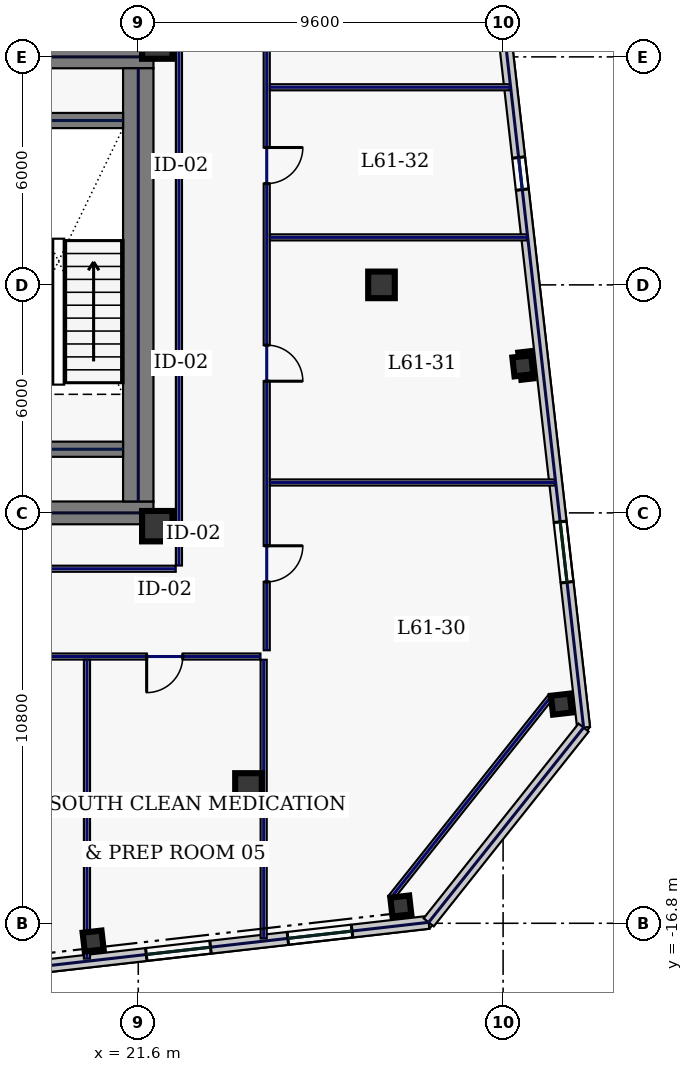
"""IFC4 building model, lengths in metres.
Left out: names, types, materials, properties, quantities, classifications, styles, units other than length and angle.
Written with IfcOpenShell. Run it as: python <this file> out.ifc"""

import sys

from ifc_helpers import new_model, si_unit, direction, frame, frame_2d, origin, origin_2d, place, context, subcontext, project, spatial, rectangle, hollow_rectangle, extrude, element, fill, save


model = new_model("IFC4")
c1 = context("Model", 3, precision=1e-05, world=origin(), true_north=direction((0.0, 1.0)))
c2 = subcontext(c1, "Body", "Model", "MODEL_VIEW")
j1 = project(units=[si_unit("LENGTHUNIT", "METRE"), si_unit("PLANEANGLEUNIT", "RADIAN")], contexts=[c1])
p1 = place(None, origin())
s1 = spatial("IfcSite", under=j1, at=p1, CompositionType="ELEMENT")
p2 = place(p1, origin())
s2 = spatial("IfcBuilding", under=s1, at=p2, CompositionType="ELEMENT")
p3 = place(p2, frame((0.0, 0.0, 263.0)))
s3 = spatial("IfcBuildingStorey", under=s2, at=p3, CompositionType="ELEMENT", Elevation=263.0)
for number, where, z_axis, x_axis in (
    (1, (10.5, 6.0, 0.0), (0.0, 0.0, 1.0), (1.0, 0.0, 0.0)),
    (2, (10.5, -6.0, 0.0), (0.0, 0.0, 1.0), (1.0, 0.0, 0.0)),
):
    element("IfcWall", number, at=place(p3, frame(where, z_axis=z_axis, x_axis=x_axis)), inside=s3, PredefinedType="SHEAR", context=c2, shape_type="SweptSolid", body=[
        extrude(rectangle(XDim=11.5, YDim=0.6, at=frame_2d((5.75, 0.0))), origin(), (0.0, 0.0, 1.0), 3.74),
    ])
p4 = place(p3, frame((21.6, -5.7, 0.0), z_axis=(0.0, 0.0, 1.0), x_axis=(0.0, 1.0, 0.0)))
e3 = element("IfcWall", 3, at=p4, inside=s3, PredefinedType="SHEAR", context=c2, shape_type="SweptSolid", body=[
    extrude(rectangle(XDim=11.4, YDim=0.8, at=frame_2d((5.7, 0.0))), origin(), (0.0, 0.0, 1.0), 3.74),
])
for number, where, z_axis, x_axis in (
    (4, (17.8, -4.325, 0.0), (0.0, 0.0, 1.0), (1.0, 0.0, 0.0)),
    (5, (17.8, 4.325, 0.0), (0.0, 0.0, 1.0), (1.0, 0.0, 0.0)),
):
    element("IfcWall", number, at=place(p3, frame(where, z_axis=z_axis, x_axis=x_axis)), inside=s3, PredefinedType="SHEAR", context=c2, shape_type="SweptSolid", body=[
        extrude(rectangle(XDim=3.4, YDim=0.4, at=frame_2d((1.7, 0.0))), origin(), (0.0, 0.0, 1.0), 3.74),
    ])
for number, where, z_axis, x_axis in (
    (6, (22.1, -6.35, 0.0), (0.0, 0.0, 1.0), (1.0, 0.0, 0.0)),
    (7, (22.1, 6.35, 0.0), (0.0, 0.0, 1.0), (1.0, 0.0, 0.0)),
):
    element("IfcColumn", number, at=place(p3, frame(where, z_axis=z_axis, x_axis=x_axis)), inside=s3, PredefinedType="COLUMN", context=c2, shape_type="SweptSolid", body=[
        extrude(hollow_rectangle(XDim=0.8, YDim=0.8, WallThickness=0.036, at=origin_2d()), origin(), (0.0, 0.0, 1.0), 3.74),
    ])
for number, where, z_axis, x_axis in (
    (8, (24.5, -13.2, 0.0), (0.0, 0.0, 1.0), (1.0, 0.0, 0.0)),
    (9, (28.0, 0.0, 0.0), (0.0, 0.0, 1.0), (1.0, 0.0, 0.0)),
):
    element("IfcColumn", number, at=place(p3, frame(where, z_axis=z_axis, x_axis=x_axis)), inside=s3, PredefinedType="COLUMN", context=c2, shape_type="SweptSolid", body=[
        extrude(hollow_rectangle(XDim=0.7, YDim=0.7, WallThickness=0.032, at=origin_2d()), origin(), (0.0, 0.0, 1.0), 3.74),
    ])
for number, where, z_axis, x_axis in (
    (10, (20.412, -17.268, 0.0), (0.0, 0.0, 1.0), (0.994, 0.113, 0.0)),
    (11, (28.509, -16.345, 0.0), (0.0, 0.0, 1.0), (0.994, 0.113, 0.0)),
    (12, (32.734, -11.033, 0.0), (0.0, 0.0, 1.0), (0.994, 0.113, 0.0)),
    (13, (31.72, -2.131, 0.0), (0.0, 0.0, 1.0), (0.994, 0.113, 0.0)),
):
    element("IfcColumn", number, at=place(p3, frame(where, z_axis=z_axis, x_axis=x_axis)), inside=s3, PredefinedType="COLUMN", context=c2, shape_type="SweptSolid", body=[
        extrude(hollow_rectangle(XDim=0.5, YDim=0.5, WallThickness=0.025, at=origin_2d()), origin(), (0.0, 0.0, 1.0), 3.74),
    ])
p5 = place(p3, frame((10.71, -18.886, 0.0), z_axis=(0.0, 0.0, 1.0), x_axis=(0.993572271362, 0.113199565282, 0.0)))
e14 = element("IfcWall", 14, at=p5, inside=s3, PredefinedType="STANDARD", context=c2, shape_type="SweptSolid", body=[
    extrude(rectangle(XDim=18.651, YDim=0.34, at=frame_2d((9.326, 0.0))), origin(), (0.0, 0.0, 1.0), 3.74),
])
p6 = place(p5, frame((3.024, 0.0, 0.88)))
e15 = element("IfcOpeningElement", 15, at=p6, cuts=e14, PredefinedType="OPENING", context=c2, shape_type="SweptSolid", body=[
    extrude(rectangle(XDim=1.7, YDim=1.95, at=frame_2d((0.85, 0.975))), frame((0.0, 0.18, 0.0), z_axis=(0.0, -1.0, 0.0), x_axis=(1.0, 0.0, 0.0)), (0.0, 0.0, 1.0), 0.36),
])
p7 = place(p5, frame((6.773, 0.0, 0.88)))
e16 = element("IfcOpeningElement", 16, at=p7, cuts=e14, PredefinedType="OPENING", context=c2, shape_type="SweptSolid", body=[
    extrude(rectangle(XDim=1.7, YDim=1.95, at=frame_2d((0.85, 0.975))), frame((0.0, 0.18, 0.0), z_axis=(0.0, -1.0, 0.0), x_axis=(1.0, 0.0, 0.0)), (0.0, 0.0, 1.0), 0.36),
])
p8 = place(p5, frame((11.173, 0.0, 0.88)))
e17 = element("IfcOpeningElement", 17, at=p8, cuts=e14, PredefinedType="OPENING", context=c2, shape_type="SweptSolid", body=[
    extrude(rectangle(XDim=1.7, YDim=1.95, at=frame_2d((0.85, 0.975))), frame((0.0, 0.18, 0.0), z_axis=(0.0, -1.0, 0.0), x_axis=(1.0, 0.0, 0.0)), (0.0, 0.0, 1.0), 0.36),
])
p9 = place(p5, frame((14.921, 0.0, 0.88)))
e18 = element("IfcOpeningElement", 18, at=p9, cuts=e14, PredefinedType="OPENING", context=c2, shape_type="SweptSolid", body=[
    extrude(rectangle(XDim=1.7, YDim=1.95, at=frame_2d((0.85, 0.975))), frame((0.0, 0.18, 0.0), z_axis=(0.0, -1.0, 0.0), x_axis=(1.0, 0.0, 0.0)), (0.0, 0.0, 1.0), 0.36),
])
p10 = place(p3, frame((33.318, -11.651, 0.0), z_axis=(0.0, 0.0, 1.0), x_axis=(-0.11320360501, 0.9935718111, 0.0)))
e19 = element("IfcWall", 19, at=p10, inside=s3, PredefinedType="STANDARD", context=c2, shape_type="SweptSolid", body=[
    extrude(rectangle(XDim=37.2, YDim=0.34, at=frame_2d((18.6, 0.0))), origin(), (0.0, 0.0, 1.0), 3.74),
])
p11 = place(p10, frame((3.85, 0.0, 0.58)))
e20 = element("IfcOpeningElement", 20, at=p11, cuts=e19, PredefinedType="OPENING", context=c2, shape_type="SweptSolid", body=[
    extrude(rectangle(XDim=1.6, YDim=2.3, at=frame_2d((0.8, 1.15))), frame((0.0, 0.18, 0.0), z_axis=(0.0, -1.0, 0.0), x_axis=(1.0, 0.0, 0.0)), (0.0, 0.0, 1.0), 0.36),
])
p12 = place(p10, frame((14.25, 0.0, 0.75)))
e21 = element("IfcOpeningElement", 21, at=p12, cuts=e19, PredefinedType="OPENING", context=c2, shape_type="SweptSolid", body=[
    extrude(rectangle(XDim=0.85, YDim=1.85, at=frame_2d((0.425, 0.925))), frame((0.0, 0.18, 0.0), z_axis=(0.0, -1.0, 0.0), x_axis=(1.0, 0.0, 0.0)), (0.0, 0.0, 1.0), 0.36),
])
p13 = place(p10, frame((22.45, 0.0, 0.58)))
e22 = element("IfcOpeningElement", 22, at=p13, cuts=e19, PredefinedType="OPENING", context=c2, shape_type="SweptSolid", body=[
    extrude(rectangle(XDim=1.6, YDim=2.3, at=frame_2d((0.8, 1.15))), frame((0.0, 0.18, 0.0), z_axis=(0.0, -1.0, 0.0), x_axis=(1.0, 0.0, 0.0)), (0.0, 0.0, 1.0), 0.36),
])
p14 = place(p10, frame((31.75, 0.0, 0.58)))
e23 = element("IfcOpeningElement", 23, at=p14, cuts=e19, PredefinedType="OPENING", context=c2, shape_type="SweptSolid", body=[
    extrude(rectangle(XDim=1.6, YDim=2.3, at=frame_2d((0.8, 1.15))), frame((0.0, 0.18, 0.0), z_axis=(0.0, -1.0, 0.0), x_axis=(1.0, 0.0, 0.0)), (0.0, 0.0, 1.0), 0.36),
])
p15 = place(p3, frame((29.242, -16.775, 0.0), z_axis=(0.0, 0.0, 1.0), x_axis=(0.62252823689, 0.78259733853, 0.0)))
e24 = element("IfcWall", 24, at=p15, inside=s3, PredefinedType="STANDARD", context=c2, shape_type="SweptSolid", body=[
    extrude(rectangle(XDim=6.548, YDim=0.34, at=frame_2d((3.274, 0.0))), origin(), (0.0, 0.0, 1.0), 3.74),
])
p16 = place(p3, frame((28.242, -16.134, 0.0), z_axis=(0.0, 0.0, 1.0), x_axis=(0.622521563328, 0.782602647064, 0.0)))
e25 = element("IfcWall", 25, at=p16, inside=s3, PredefinedType="PARTITIONING", context=c2, shape_type="SweptSolid", body=[
    extrude(rectangle(XDim=6.788, YDim=0.16, at=frame_2d((3.394, 0.0))), origin(), (0.0, 0.0, 1.0), 3.74),
])
p17 = place(p3, frame((24.98, 9.665, 0.0), z_axis=(0.0, 0.0, 1.0), x_axis=(0.0, -1.0, 0.0)))
e26 = element("IfcWall", 26, at=p17, inside=s3, PredefinedType="PARTITIONING", context=c2, shape_type="SweptSolid", body=[
    extrude(rectangle(XDim=19.28, YDim=0.16, at=frame_2d((9.64, 0.0))), origin(), (0.0, 0.0, 1.0), 3.74),
])
p18 = place(p17, frame((16.531, 0.0, 0.0)))
e27 = element("IfcOpeningElement", 27, at=p18, cuts=e26, PredefinedType="OPENING", context=c2, shape_type="SweptSolid", body=[
    extrude(rectangle(XDim=0.95, YDim=2.2, at=frame_2d((0.475, 1.1))), frame((0.0, 0.09, 0.0), z_axis=(0.0, -1.0, 0.0), x_axis=(1.0, 0.0, 0.0)), (0.0, 0.0, 1.0), 0.18),
])
p19 = place(p17, frame((11.25, 0.0, 0.0)))
e28 = element("IfcOpeningElement", 28, at=p19, cuts=e26, PredefinedType="OPENING", context=c2, shape_type="SweptSolid", body=[
    extrude(rectangle(XDim=0.95, YDim=2.2, at=frame_2d((0.475, 1.1))), frame((0.0, 0.09, 0.0), z_axis=(0.0, -1.0, 0.0), x_axis=(1.0, 0.0, 0.0)), (0.0, 0.0, 1.0), 0.18),
])
p20 = place(p17, frame((6.05, 0.0, 0.0)))
e29 = element("IfcOpeningElement", 29, at=p20, cuts=e26, PredefinedType="OPENING", context=c2, shape_type="SweptSolid", body=[
    extrude(rectangle(XDim=0.95, YDim=2.2, at=frame_2d((0.475, 1.1))), frame((0.0, 0.09, 0.0), z_axis=(0.0, -1.0, 0.0), x_axis=(1.0, 0.0, 0.0)), (0.0, 0.0, 1.0), 0.18),
])
p21 = place(p17, frame((1.994, 0.0, 0.0)))
e30 = element("IfcOpeningElement", 30, at=p21, cuts=e26, PredefinedType="OPENING", context=c2, shape_type="SweptSolid", body=[
    extrude(rectangle(XDim=0.95, YDim=2.2, at=frame_2d((0.475, 1.1))), frame((0.0, 0.09, 0.0), z_axis=(0.0, -1.0, 0.0), x_axis=(1.0, 0.0, 0.0)), (0.0, 0.0, 1.0), 0.18),
])
p22 = place(p3, frame((24.815, -9.78, 0.0), z_axis=(0.0, 0.0, 1.0), x_axis=(-1.0, 0.0, 0.0)))
e31 = element("IfcWall", 31, at=p22, inside=s3, PredefinedType="PARTITIONING", context=c2, shape_type="SweptSolid", body=[
    extrude(rectangle(XDim=37.35, YDim=0.16, at=frame_2d((18.675, 0.0))), origin(), (0.0, 0.0, 1.0), 3.74),
])
p23 = place(p22, frame((27.55, 0.0, 0.0)))
e32 = element("IfcOpeningElement", 32, at=p23, cuts=e31, PredefinedType="OPENING", context=c2, shape_type="SweptSolid", body=[
    extrude(rectangle(XDim=0.95, YDim=2.2, at=frame_2d((0.475, 1.1))), frame((0.0, 0.09, 0.0), z_axis=(0.0, -1.0, 0.0), x_axis=(1.0, 0.0, 0.0)), (0.0, 0.0, 1.0), 0.18),
])
p24 = place(p22, frame((19.275, 0.0, 0.0)))
e33 = element("IfcOpeningElement", 33, at=p24, cuts=e31, PredefinedType="OPENING", context=c2, shape_type="SweptSolid", body=[
    extrude(rectangle(XDim=1.3, YDim=2.2, at=frame_2d((0.65, 1.1))), frame((0.0, 0.09, 0.0), z_axis=(0.0, -1.0, 0.0), x_axis=(1.0, 0.0, 0.0)), (0.0, 0.0, 1.0), 0.18),
])
p25 = place(p22, frame((9.725, 0.0, 0.0)))
e34 = element("IfcOpeningElement", 34, at=p25, cuts=e31, PredefinedType="OPENING", context=c2, shape_type="SweptSolid", body=[
    extrude(rectangle(XDim=1.3, YDim=2.2, at=frame_2d((0.65, 1.1))), frame((0.0, 0.09, 0.0), z_axis=(0.0, -1.0, 0.0), x_axis=(1.0, 0.0, 0.0)), (0.0, 0.0, 1.0), 0.18),
])
p26 = place(p22, frame((2.044, 0.0, 0.0)))
e35 = element("IfcOpeningElement", 35, at=p26, cuts=e31, PredefinedType="OPENING", context=c2, shape_type="SweptSolid", body=[
    extrude(rectangle(XDim=0.95, YDim=2.2, at=frame_2d((0.475, 1.1))), frame((0.0, 0.09, 0.0), z_axis=(0.0, -1.0, 0.0), x_axis=(1.0, 0.0, 0.0)), (0.0, 0.0, 1.0), 0.18),
])
p27 = place(p3, frame((10.715, -7.47, 0.0), z_axis=(0.0, 0.0, 1.0), x_axis=(1.0, 0.0, 0.0)))
e36 = element("IfcWall", 36, at=p27, inside=s3, PredefinedType="PARTITIONING", context=c2, shape_type="SweptSolid", body=[
    extrude(rectangle(XDim=11.87, YDim=0.16, at=frame_2d((5.935, 0.0))), origin(), (0.0, 0.0, 1.0), 3.74),
])
p28 = place(p3, frame((22.67, -7.385, 0.0), z_axis=(0.0, 0.0, 1.0), x_axis=(0.0, 1.0, 0.0)))
e37 = element("IfcWall", 37, at=p28, inside=s3, PredefinedType="PARTITIONING", context=c2, shape_type="SweptSolid", body=[
    extrude(rectangle(XDim=14.82, YDim=0.16, at=frame_2d((7.41, 0.0))), origin(), (0.0, 0.0, 1.0), 3.74),
])
p29 = place(p3, frame((24.9, -17.199, 0.0), z_axis=(0.0, 0.0, 1.0), x_axis=(0.0, 1.0, 0.0)))
e38 = element("IfcWall", 38, at=p29, inside=s3, PredefinedType="PARTITIONING", context=c2, shape_type="SweptSolid", body=[
    extrude(rectangle(XDim=7.334, YDim=0.16, at=frame_2d((3.667, 0.0))), origin(), (0.0, 0.0, 1.0), 3.74),
])
p30 = place(p3, frame((20.25, -17.729, 0.0), z_axis=(0.0, 0.0, 1.0), x_axis=(0.0, 1.0, 0.0)))
e39 = element("IfcWall", 39, at=p30, inside=s3, PredefinedType="PARTITIONING", context=c2, shape_type="SweptSolid", body=[
    extrude(rectangle(XDim=7.864, YDim=0.16, at=frame_2d((3.932, 0.0))), origin(), (0.0, 0.0, 1.0), 3.74),
])
p31 = place(p3, frame((25.065, -5.2, 0.0), z_axis=(0.0, 0.0, 1.0), x_axis=(1.0, 0.0, 0.0)))
e40 = element("IfcWall", 40, at=p31, inside=s3, PredefinedType="PARTITIONING", context=c2, shape_type="SweptSolid", body=[
    extrude(rectangle(XDim=7.498, YDim=0.16, at=frame_2d((3.749, 0.0))), origin(), (0.0, 0.0, 1.0), 3.74),
])
p32 = place(p3, frame((25.065, 1.25, 0.0), z_axis=(0.0, 0.0, 1.0), x_axis=(1.0, 0.0, 0.0)))
e41 = element("IfcWall", 41, at=p32, inside=s3, PredefinedType="PARTITIONING", context=c2, shape_type="SweptSolid", body=[
    extrude(rectangle(XDim=6.763, YDim=0.16, at=frame_2d((3.382, 0.0))), origin(), (0.0, 0.0, 1.0), 3.74),
])
p33 = place(p3, frame((25.065, 5.2, 0.0), z_axis=(0.0, 0.0, 1.0), x_axis=(1.0, 0.0, 0.0)))
e42 = element("IfcWall", 42, at=p33, inside=s3, PredefinedType="PARTITIONING", context=c2, shape_type="SweptSolid", body=[
    extrude(rectangle(XDim=6.313, YDim=0.16, at=frame_2d((3.157, 0.0))), origin(), (0.0, 0.0, 1.0), 3.74),
])
p34 = place(p8, origin())
e43 = element("IfcWindow", 43, at=p34, inside=s3, PartitioningType="SINGLE_PANEL", PredefinedType="WINDOW", context=c2, shape_type="SweptSolid", body=[
    extrude(rectangle(XDim=1.7, YDim=1.95, at=frame_2d((0.85, 0.975))), frame((0.0, 0.03, 0.0), z_axis=(0.0, -1.0, 0.0), x_axis=(1.0, 0.0, 0.0)), (0.0, 0.0, 1.0), 0.06),
])
fill(e17, e43)
p35 = place(p9, origin())
e44 = element("IfcWindow", 44, at=p35, inside=s3, PartitioningType="SINGLE_PANEL", PredefinedType="WINDOW", context=c2, shape_type="SweptSolid", body=[
    extrude(rectangle(XDim=1.7, YDim=1.95, at=frame_2d((0.85, 0.975))), frame((0.0, 0.03, 0.0), z_axis=(0.0, -1.0, 0.0), x_axis=(1.0, 0.0, 0.0)), (0.0, 0.0, 1.0), 0.06),
])
fill(e18, e44)
p36 = place(p11, origin())
e45 = element("IfcWindow", 45, at=p36, inside=s3, PartitioningType="SINGLE_PANEL", PredefinedType="WINDOW", context=c2, shape_type="SweptSolid", body=[
    extrude(rectangle(XDim=1.6, YDim=2.3, at=frame_2d((0.8, 1.15))), frame((0.0, 0.03, 0.0), z_axis=(0.0, -1.0, 0.0), x_axis=(1.0, 0.0, 0.0)), (0.0, 0.0, 1.0), 0.06),
])
fill(e20, e45)
p37 = place(p12, origin())
e46 = element("IfcWindow", 46, at=p37, inside=s3, PartitioningType="SINGLE_PANEL", PredefinedType="WINDOW", context=c2, shape_type="SweptSolid", body=[
    extrude(rectangle(XDim=0.85, YDim=1.85, at=frame_2d((0.425, 0.925))), frame((0.0, 0.03, 0.0), z_axis=(0.0, -1.0, 0.0), x_axis=(1.0, 0.0, 0.0)), (0.0, 0.0, 1.0), 0.06),
])
fill(e21, e46)
p38 = place(p26, origin())
e47 = element("IfcDoor", 47, at=p38, inside=s3, OperationType="SINGLE_SWING_RIGHT", PredefinedType="DOOR", context=c2, shape_type="SweptSolid", body=[
    extrude(rectangle(XDim=0.95, YDim=2.2, at=frame_2d((0.475, 1.1))), frame((0.0, 0.025, 0.0), z_axis=(0.0, -1.0, 0.0), x_axis=(1.0, 0.0, 0.0)), (0.0, 0.0, 1.0), 0.05),
])
fill(e35, e47)
p39 = place(p18, origin())
e48 = element("IfcDoor", 48, at=p39, inside=s3, OperationType="SINGLE_SWING_LEFT", PredefinedType="DOOR", context=c2, shape_type="SweptSolid", body=[
    extrude(rectangle(XDim=0.95, YDim=2.2, at=frame_2d((0.475, 1.1))), frame((0.0, 0.025, 0.0), z_axis=(0.0, -1.0, 0.0), x_axis=(1.0, 0.0, 0.0)), (0.0, 0.0, 1.0), 0.05),
])
fill(e27, e48)
p40 = place(p19, origin())
e49 = element("IfcDoor", 49, at=p40, inside=s3, OperationType="SINGLE_SWING_RIGHT", PredefinedType="DOOR", context=c2, shape_type="SweptSolid", body=[
    extrude(rectangle(XDim=0.95, YDim=2.2, at=frame_2d((0.475, 1.1))), frame((0.0, 0.025, 0.0), z_axis=(0.0, -1.0, 0.0), x_axis=(1.0, 0.0, 0.0)), (0.0, 0.0, 1.0), 0.05),
])
fill(e28, e49)
p41 = place(p20, origin())
e50 = element("IfcDoor", 50, at=p41, inside=s3, OperationType="SINGLE_SWING_LEFT", PredefinedType="DOOR", context=c2, shape_type="SweptSolid", body=[
    extrude(rectangle(XDim=0.95, YDim=2.2, at=frame_2d((0.475, 1.1))), frame((0.0, 0.025, 0.0), z_axis=(0.0, -1.0, 0.0), x_axis=(1.0, 0.0, 0.0)), (0.0, 0.0, 1.0), 0.05),
])
fill(e29, e50)
save(model, sys.argv[1])
